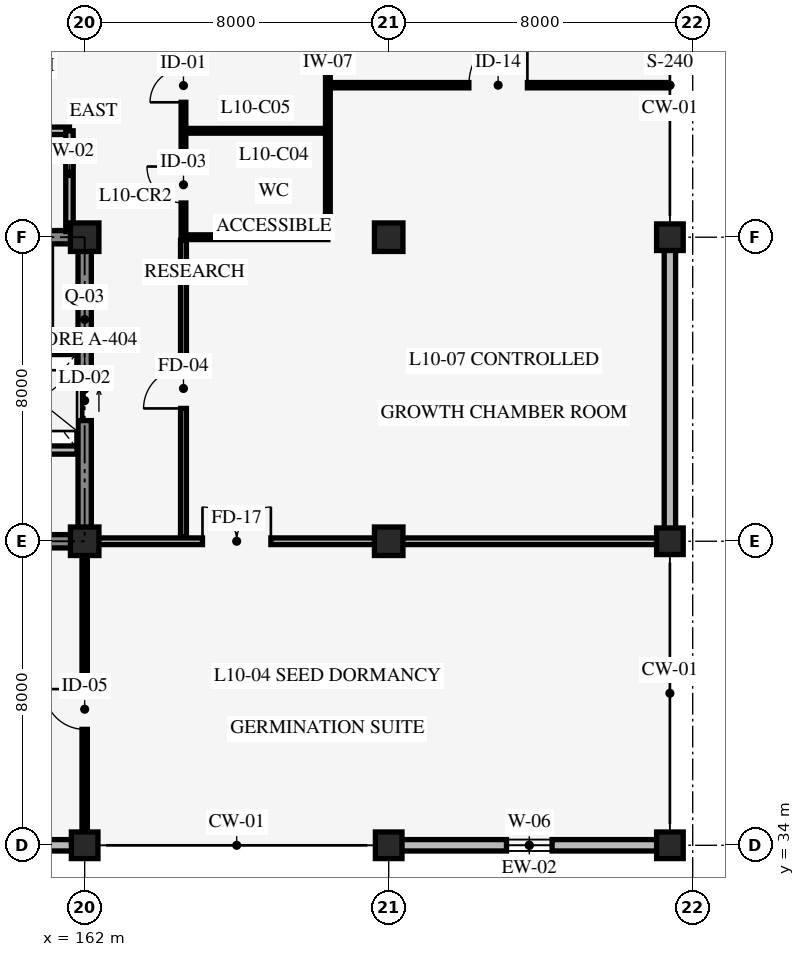
"""IFC4 building model, lengths in metres.
Left out: names, types, materials, properties, quantities, classifications, styles, units other than length and angle.
Written with IfcOpenShell. Run it as: python <this file> out.ifc"""

import sys

from ifc_helpers import new_model, si_unit, direction, frame, frame_2d, origin, origin_2d, place, context, subcontext, project, spatial, rectangle, extrude, element, fill, save


model = new_model("IFC4")
c1 = context("Model", 3, precision=1e-05, world=origin(), true_north=direction((0.0, 1.0)))
c2 = subcontext(c1, "Body", "Model", "MODEL_VIEW")
j1 = project(units=[si_unit("LENGTHUNIT", "METRE"), si_unit("PLANEANGLEUNIT", "RADIAN")], contexts=[c1])
p1 = place(None, origin())
s1 = spatial("IfcSite", under=j1, at=p1, CompositionType="ELEMENT")
p2 = place(p1, origin())
s2 = spatial("IfcBuilding", under=s1, at=p2, CompositionType="ELEMENT")
p3 = place(p2, frame((0.0, 0.0, 40.2)))
s3 = spatial("IfcBuildingStorey", under=s2, at=p3, CompositionType="ELEMENT", Elevation=40.2)
p4 = place(p3, frame((154.0, 42.0, 0.0), z_axis=(0.0, 0.0, 1.0), x_axis=(1.0, 0.0, 0.0)))
e1 = element("IfcWall", 1, at=p4, inside=s3, PredefinedType="SHEAR", context=c2, shape_type="SweptSolid", body=[
    extrude(rectangle(XDim=8.0, YDim=0.35, at=frame_2d((4.0, 0.0))), origin(), (0.0, 0.0, 1.0), 3.95),
])
p5 = place(p3, frame((162.0, 42.0, 0.0), z_axis=(0.0, 0.0, 1.0), x_axis=(0.0, 1.0, 0.0)))
e2 = element("IfcWall", 2, at=p5, inside=s3, PredefinedType="SHEAR", context=c2, shape_type="SweptSolid", body=[
    extrude(rectangle(XDim=8.0, YDim=0.35, at=frame_2d((4.0, 0.0))), origin(), (0.0, 0.0, 1.0), 3.95),
])
p6 = place(p5, frame((3.175, 0.0, 0.0)))
e3 = element("IfcOpeningElement", 3, at=p6, cuts=e2, PredefinedType="OPENING", context=c2, shape_type="SweptSolid", body=[
    extrude(rectangle(XDim=1.05, YDim=2.2, at=frame_2d((0.525, 1.1))), frame((0.0, 0.185, 0.0), z_axis=(0.0, -1.0, 0.0), x_axis=(1.0, 0.0, 0.0)), (0.0, 0.0, 1.0), 0.37),
])
p7 = place(p3, frame((162.0, 50.0, 0.0), z_axis=(0.0, 0.0, 1.0), x_axis=(-1.0, 0.0, 0.0)))
e4 = element("IfcWall", 4, at=p7, inside=s3, PredefinedType="SHEAR", context=c2, shape_type="SweptSolid", body=[
    extrude(rectangle(XDim=8.0, YDim=0.35, at=frame_2d((4.0, 0.0))), origin(), (0.0, 0.0, 1.0), 3.95),
])
p8 = place(p7, frame((5.3, 0.0, 0.0)))
e5 = element("IfcOpeningElement", 5, at=p8, cuts=e4, PredefinedType="OPENING", context=c2, shape_type="SweptSolid", body=[
    extrude(rectangle(XDim=1.3, YDim=2.15, at=frame_2d((0.65, 1.075))), frame((0.0, 0.185, 0.0), z_axis=(0.0, -1.0, 0.0), x_axis=(1.0, 0.0, 0.0)), (0.0, 0.0, 1.0), 0.37),
])
p9 = place(p7, frame((1.45, 0.0, 0.0)))
e6 = element("IfcOpeningElement", 6, at=p9, cuts=e4, PredefinedType="OPENING", context=c2, shape_type="SweptSolid", body=[
    extrude(rectangle(XDim=1.1, YDim=2.2, at=frame_2d((0.55, 1.1))), frame((0.0, 0.185, 0.0), z_axis=(0.0, -1.0, 0.0), x_axis=(1.0, 0.0, 0.0)), (0.0, 0.0, 1.0), 0.37),
])
p10 = place(p3, frame((162.0, 34.0, 0.0), z_axis=(0.0, 0.0, 1.0), x_axis=(1.0, 0.0, 0.0)))
e7 = element("IfcColumn", 7, at=p10, inside=s3, PredefinedType="COLUMN", context=c2, shape_type="SweptSolid", body=[
    extrude(rectangle(XDim=0.7, YDim=0.7, at=origin_2d()), origin(), (0.0, 0.0, 1.0), 4.2),
])
for number, where, z_axis, x_axis in (
    (8, (162.0, 42.0, 0.0), (0.0, 0.0, 1.0), (1.0, 0.0, 0.0)),
    (9, (162.0, 50.0, 0.0), (0.0, 0.0, 1.0), (1.0, 0.0, 0.0)),
):
    element("IfcColumn", number, at=place(p3, frame(where, z_axis=z_axis, x_axis=x_axis)), inside=s3, PredefinedType="COLUMN", context=c2, shape_type="SweptSolid", body=[
        extrude(rectangle(XDim=0.75, YDim=0.75, at=origin_2d()), origin(), (0.0, 0.0, 1.0), 4.2),
    ])
p11 = place(p3, frame((170.0, 34.0, 0.0), z_axis=(0.0, 0.0, 1.0), x_axis=(1.0, 0.0, 0.0)))
e10 = element("IfcColumn", 10, at=p11, inside=s3, PredefinedType="COLUMN", context=c2, shape_type="SweptSolid", body=[
    extrude(rectangle(XDim=0.7, YDim=0.7, at=origin_2d()), origin(), (0.0, 0.0, 1.0), 4.2),
])
for number, where, z_axis, x_axis in (
    (11, (170.0, 42.0, 0.0), (0.0, 0.0, 1.0), (1.0, 0.0, 0.0)),
    (12, (170.0, 50.0, 0.0), (0.0, 0.0, 1.0), (1.0, 0.0, 0.0)),
):
    element("IfcColumn", number, at=place(p3, frame(where, z_axis=z_axis, x_axis=x_axis)), inside=s3, PredefinedType="COLUMN", context=c2, shape_type="SweptSolid", body=[
        extrude(rectangle(XDim=0.75, YDim=0.75, at=origin_2d()), origin(), (0.0, 0.0, 1.0), 4.2),
    ])
for number, where, z_axis, x_axis in (
    (13, (177.4, 34.0, 0.0), (0.0, 0.0, 1.0), (1.0, 0.0, 0.0)),
    (14, (177.4, 42.0, 0.0), (0.0, 0.0, 1.0), (1.0, 0.0, 0.0)),
    (15, (177.4, 50.0, 0.0), (0.0, 0.0, 1.0), (1.0, 0.0, 0.0)),
):
    element("IfcColumn", number, at=place(p3, frame(where, z_axis=z_axis, x_axis=x_axis)), inside=s3, PredefinedType="COLUMN", context=c2, shape_type="SweptSolid", body=[
        extrude(rectangle(XDim=0.7, YDim=0.7, at=origin_2d()), origin(), (0.0, 0.0, 1.0), 4.2),
    ])
p12 = place(p3, frame((177.4, 34.0, 0.0), z_axis=(0.0, 0.0, 1.0), x_axis=(-1.0, 0.0, 0.0)))
e16 = element("IfcWall", 16, at=p12, inside=s3, PredefinedType="STANDARD", context=c2, shape_type="SweptSolid", body=[
    extrude(rectangle(XDim=7.4, YDim=0.3, at=frame_2d((3.7, 0.0))), origin(), (0.0, 0.0, 1.0), 3.09),
])
p13 = place(p12, frame((3.1, 0.0, 0.85)))
e17 = element("IfcOpeningElement", 17, at=p13, cuts=e16, PredefinedType="OPENING", context=c2, shape_type="SweptSolid", body=[
    extrude(rectangle(XDim=1.2, YDim=1.2, at=frame_2d((0.6, 0.6))), frame((0.0, 0.16, 0.0), z_axis=(0.0, -1.0, 0.0), x_axis=(1.0, 0.0, 0.0)), (0.0, 0.0, 1.0), 0.32),
])
p14 = place(p3, frame((162.0, 34.0, 0.0), z_axis=(0.0, 0.0, 1.0), x_axis=(-1.0, 0.0, 0.0)))
e18 = element("IfcWall", 18, at=p14, inside=s3, PredefinedType="STANDARD", context=c2, shape_type="SweptSolid", body=[
    extrude(rectangle(XDim=8.0, YDim=0.3, at=frame_2d((4.0, 0.0))), origin(), (0.0, 0.0, 1.0), 3.09),
])
p15 = place(p14, frame((3.0, 0.0, 0.85)))
e19 = element("IfcOpeningElement", 19, at=p15, cuts=e18, PredefinedType="OPENING", context=c2, shape_type="SweptSolid", body=[
    extrude(rectangle(XDim=2.0, YDim=1.5, at=frame_2d((1.0, 0.75))), frame((0.0, 0.16, 0.0), z_axis=(0.0, -1.0, 0.0), x_axis=(1.0, 0.0, 0.0)), (0.0, 0.0, 1.0), 0.32),
])
p16 = place(p3, frame((177.4, 50.0, 0.0), z_axis=(0.0, 0.0, 1.0), x_axis=(0.0, -1.0, 0.0)))
e20 = element("IfcWall", 20, at=p16, inside=s3, PredefinedType="STANDARD", context=c2, shape_type="SweptSolid", body=[
    extrude(rectangle(XDim=8.0, YDim=0.3, at=frame_2d((4.0, 0.0))), origin(), (0.0, 0.0, 1.0), 3.14),
])
p17 = place(p3, frame((158.45, 47.02, 0.0), z_axis=(0.0, 0.0, 1.0), x_axis=(1.0, 0.0, 0.0)))
e21 = element("IfcWall", 21, at=p17, inside=s3, PredefinedType="STANDARD", context=c2, shape_type="SweptSolid", body=[
    extrude(rectangle(XDim=3.35, YDim=0.215, at=frame_2d((1.675, 0.0))), origin(), (0.0, 0.0, 1.0), 3.9),
])
p18 = place(p3, frame((159.78, 44.4, 0.0), z_axis=(0.0, 0.0, 1.0), x_axis=(1.0, 0.0, 0.0)))
e22 = element("IfcWall", 22, at=p18, inside=s3, PredefinedType="STANDARD", context=c2, shape_type="SweptSolid", body=[
    extrude(rectangle(XDim=2.02, YDim=0.215, at=frame_2d((1.01, 0.0))), origin(), (0.0, 0.0, 1.0), 3.9),
])
p19 = place(p3, frame((154.0, 52.8, 0.0), z_axis=(0.0, 0.0, 1.0), x_axis=(1.0, 0.0, 0.0)))
e23 = element("IfcWall", 23, at=p19, inside=s3, PredefinedType="STANDARD", context=c2, shape_type="SweptSolid", body=[
    extrude(rectangle(XDim=7.6, YDim=0.195, at=frame_2d((3.8, 0.0))), origin(), (0.0, 0.0, 1.0), 3.9),
])
p20 = place(p19, frame((2.8, 0.0, 0.0)))
e24 = element("IfcOpeningElement", 24, at=p20, cuts=e23, PredefinedType="OPENING", context=c2, shape_type="SweptSolid", body=[
    extrude(rectangle(XDim=1.4, YDim=2.2, at=frame_2d((0.7, 1.1))), frame((0.0, 0.107, 0.0), z_axis=(0.0, -1.0, 0.0), x_axis=(1.0, 0.0, 0.0)), (0.0, 0.0, 1.0), 0.215),
])
p21 = place(p3, frame((161.6, 50.15, 0.0), z_axis=(0.0, 0.0, 1.0), x_axis=(0.0, 1.0, 0.0)))
e25 = element("IfcWall", 25, at=p21, inside=s3, PredefinedType="STANDARD", context=c2, shape_type="SweptSolid", body=[
    extrude(rectangle(XDim=2.65, YDim=0.195, at=frame_2d((1.325, 0.0))), origin(), (0.0, 0.0, 1.0), 3.14),
])
p22 = place(p3, frame((164.6, 50.0, 0.0), z_axis=(0.0, 0.0, 1.0), x_axis=(0.0, 1.0, 0.0)))
e26 = element("IfcWall", 26, at=p22, inside=s3, PredefinedType="STANDARD", context=c2, shape_type="SweptSolid", body=[
    extrude(rectangle(XDim=8.0, YDim=0.125, at=frame_2d((4.0, 0.0))), origin(), (0.0, 0.0, 1.0), 3.9),
])
p23 = place(p22, frame((0.9, 0.0, 0.0)))
e27 = element("IfcOpeningElement", 27, at=p23, cuts=e26, PredefinedType="OPENING", context=c2, shape_type="SweptSolid", body=[
    extrude(rectangle(XDim=0.96, YDim=2.08, at=frame_2d((0.48, 1.04))), frame((0.0, 0.073, 0.0), z_axis=(0.0, -1.0, 0.0), x_axis=(1.0, 0.0, 0.0)), (0.0, 0.0, 1.0), 0.145),
])
p24 = place(p22, frame((3.55, 0.0, 0.0)))
e28 = element("IfcOpeningElement", 28, at=p24, cuts=e26, PredefinedType="OPENING", context=c2, shape_type="SweptSolid", body=[
    extrude(rectangle(XDim=0.88, YDim=2.05, at=frame_2d((0.44, 1.025))), frame((0.0, 0.073, 0.0), z_axis=(0.0, -1.0, 0.0), x_axis=(1.0, 0.0, 0.0)), (0.0, 0.0, 1.0), 0.145),
])
p25 = place(p22, frame((6.15, 0.0, 0.0)))
e29 = element("IfcOpeningElement", 29, at=p25, cuts=e26, PredefinedType="OPENING", context=c2, shape_type="SweptSolid", body=[
    extrude(rectangle(XDim=0.92, YDim=2.05, at=frame_2d((0.46, 1.025))), frame((0.0, 0.073, 0.0), z_axis=(0.0, -1.0, 0.0), x_axis=(1.0, 0.0, 0.0)), (0.0, 0.0, 1.0), 0.145),
])
p26 = place(p3, frame((168.4, 50.0, 0.0), z_axis=(0.0, 0.0, 1.0), x_axis=(0.0, 1.0, 0.0)))
e30 = element("IfcWall", 30, at=p26, inside=s3, PredefinedType="STANDARD", context=c2, shape_type="SweptSolid", body=[
    extrude(rectangle(XDim=8.0, YDim=0.125, at=frame_2d((4.0, 0.0))), origin(), (0.0, 0.0, 1.0), 3.9),
])
p27 = place(p3, frame((164.6, 50.0, 0.0), z_axis=(0.0, 0.0, 1.0), x_axis=(1.0, 0.0, 0.0)))
e31 = element("IfcWall", 31, at=p27, inside=s3, PredefinedType="STANDARD", context=c2, shape_type="SweptSolid", body=[
    extrude(rectangle(XDim=3.8, YDim=0.125, at=frame_2d((1.9, 0.0))), origin(), (0.0, 0.0, 1.0), 3.09),
])
p28 = place(p3, frame((164.6, 52.8, 0.0), z_axis=(0.0, 0.0, 1.0), x_axis=(1.0, 0.0, 0.0)))
e32 = element("IfcWall", 32, at=p28, inside=s3, PredefinedType="STANDARD", context=c2, shape_type="SweptSolid", body=[
    extrude(rectangle(XDim=3.8, YDim=0.125, at=frame_2d((1.9, 0.0))), origin(), (0.0, 0.0, 1.0), 3.9),
])
p29 = place(p3, frame((164.6, 42.12, 0.0), z_axis=(0.0, 0.0, 1.0), x_axis=(0.0, 1.0, 0.0)))
e33 = element("IfcWall", 33, at=p29, inside=s3, PredefinedType="STANDARD", context=c2, shape_type="SweptSolid", body=[
    extrude(rectangle(XDim=7.8, YDim=0.155, at=frame_2d((3.9, 0.0))), origin(), (0.0, 0.0, 1.0), 3.9),
])
p30 = place(p29, frame((3.375, 0.0, 0.0)))
e34 = element("IfcOpeningElement", 34, at=p30, cuts=e33, PredefinedType="OPENING", context=c2, shape_type="SweptSolid", body=[
    extrude(rectangle(XDim=1.05, YDim=2.1, at=frame_2d((0.525, 1.05))), frame((0.0, 0.087, 0.0), z_axis=(0.0, -1.0, 0.0), x_axis=(1.0, 0.0, 0.0)), (0.0, 0.0, 1.0), 0.175),
])
p31 = place(p3, frame((168.4, 54.0, 0.0), z_axis=(0.0, 0.0, 1.0), x_axis=(1.0, 0.0, 0.0)))
e35 = element("IfcWall", 35, at=p31, inside=s3, PredefinedType="STANDARD", context=c2, shape_type="SweptSolid", body=[
    extrude(rectangle(XDim=8.96, YDim=0.14, at=frame_2d((4.48, 0.0))), origin(), (0.0, 0.0, 1.0), 3.9),
])
p32 = place(p31, frame((3.71, 0.0, 0.0)))
e36 = element("IfcOpeningElement", 36, at=p32, cuts=e35, PredefinedType="OPENING", context=c2, shape_type="SweptSolid", body=[
    extrude(rectangle(XDim=1.54, YDim=2.22, at=frame_2d((0.77, 1.11))), frame((0.0, 0.08, 0.0), z_axis=(0.0, -1.0, 0.0), x_axis=(1.0, 0.0, 0.0)), (0.0, 0.0, 1.0), 0.16),
])
p33 = place(p3, frame((162.0, 34.05, 0.0), z_axis=(0.0, 0.0, 1.0), x_axis=(0.0, 1.0, 0.0)))
e37 = element("IfcWall", 37, at=p33, inside=s3, PredefinedType="STANDARD", context=c2, shape_type="SweptSolid", body=[
    extrude(rectangle(XDim=7.83, YDim=0.14, at=frame_2d((3.915, 0.0))), origin(), (0.0, 0.0, 1.0), 3.14),
])
p34 = place(p33, frame((3.0, 0.0, 0.0)))
e38 = element("IfcOpeningElement", 38, at=p34, cuts=e37, PredefinedType="OPENING", context=c2, shape_type="SweptSolid", body=[
    extrude(rectangle(XDim=1.06, YDim=2.12, at=frame_2d((0.53, 1.06))), frame((0.0, 0.08, 0.0), z_axis=(0.0, -1.0, 0.0), x_axis=(1.0, 0.0, 0.0)), (0.0, 0.0, 1.0), 0.16),
])
p35 = place(p3, frame((162.35, 42.0, 0.0), z_axis=(0.0, 0.0, 1.0), x_axis=(1.0, 0.0, 0.0)))
e39 = element("IfcWall", 39, at=p35, inside=s3, PredefinedType="STANDARD", context=c2, shape_type="SweptSolid", body=[
    extrude(rectangle(XDim=14.7, YDim=0.175, at=frame_2d((7.35, 0.0))), origin(), (0.0, 0.0, 1.0), 3.09),
])
p36 = place(p35, frame((2.75, 0.0, 0.0)))
e40 = element("IfcOpeningElement", 40, at=p36, cuts=e39, PredefinedType="OPENING", context=c2, shape_type="SweptSolid", body=[
    extrude(rectangle(XDim=1.8, YDim=2.3, at=frame_2d((0.9, 1.15))), frame((0.0, 0.098, 0.0), z_axis=(0.0, -1.0, 0.0), x_axis=(1.0, 0.0, 0.0)), (0.0, 0.0, 1.0), 0.195),
])
p37 = place(p13, origin())
e41 = element("IfcWindow", 41, at=p37, inside=s3, PartitioningType="SINGLE_PANEL", PredefinedType="WINDOW", context=c2, shape_type="SweptSolid", body=[
    extrude(rectangle(XDim=1.2, YDim=1.2, at=frame_2d((0.6, 0.6))), frame((0.0, 0.03, 0.0), z_axis=(0.0, -1.0, 0.0), x_axis=(1.0, 0.0, 0.0)), (0.0, 0.0, 1.0), 0.06),
])
fill(e17, e41)
p38 = place(p6, origin())
e42 = element("IfcDoor", 42, at=p38, inside=s3, OperationType="SLIDING_TO_LEFT", PredefinedType="DOOR", context=c2, shape_type="SweptSolid", body=[
    extrude(rectangle(XDim=1.05, YDim=2.2, at=frame_2d((0.525, 1.1))), frame((0.0, 0.025, 0.0), z_axis=(0.0, -1.0, 0.0), x_axis=(1.0, 0.0, 0.0)), (0.0, 0.0, 1.0), 0.05),
])
fill(e3, e42)
p39 = place(p23, origin())
e43 = element("IfcDoor", 43, at=p39, inside=s3, OperationType="SINGLE_SWING_RIGHT", PredefinedType="DOOR", context=c2, shape_type="SweptSolid", body=[
    extrude(rectangle(XDim=0.96, YDim=2.08, at=frame_2d((0.48, 1.04))), frame((0.0, 0.025, 0.0), z_axis=(0.0, -1.0, 0.0), x_axis=(1.0, 0.0, 0.0)), (0.0, 0.0, 1.0), 0.05),
])
fill(e27, e43)
p40 = place(p24, origin())
e44 = element("IfcDoor", 44, at=p40, inside=s3, OperationType="SINGLE_SWING_LEFT", PredefinedType="DOOR", context=c2, shape_type="SweptSolid", body=[
    extrude(rectangle(XDim=0.88, YDim=2.05, at=frame_2d((0.44, 1.025))), frame((0.0, 0.025, 0.0), z_axis=(0.0, -1.0, 0.0), x_axis=(1.0, 0.0, 0.0)), (0.0, 0.0, 1.0), 0.05),
])
fill(e28, e44)
p41 = place(p30, origin())
e45 = element("IfcDoor", 45, at=p41, inside=s3, OperationType="SINGLE_SWING_LEFT", PredefinedType="DOOR", context=c2, shape_type="SweptSolid", body=[
    extrude(rectangle(XDim=1.05, YDim=2.1, at=frame_2d((0.525, 1.05))), frame((0.0, 0.025, 0.0), z_axis=(0.0, -1.0, 0.0), x_axis=(1.0, 0.0, 0.0)), (0.0, 0.0, 1.0), 0.05),
])
fill(e34, e45)
p42 = place(p32, origin())
e46 = element("IfcDoor", 46, at=p42, inside=s3, OperationType="SINGLE_SWING_RIGHT", PredefinedType="DOOR", context=c2, shape_type="SweptSolid", body=[
    extrude(rectangle(XDim=1.54, YDim=2.22, at=frame_2d((0.77, 1.11))), frame((0.0, 0.025, 0.0), z_axis=(0.0, -1.0, 0.0), x_axis=(1.0, 0.0, 0.0)), (0.0, 0.0, 1.0), 0.05),
])
fill(e36, e46)
p43 = place(p34, origin())
e47 = element("IfcDoor", 47, at=p43, inside=s3, OperationType="SINGLE_SWING_RIGHT", PredefinedType="DOOR", context=c2, shape_type="SweptSolid", body=[
    extrude(rectangle(XDim=1.06, YDim=2.12, at=frame_2d((0.53, 1.06))), frame((0.0, 0.025, 0.0), z_axis=(0.0, -1.0, 0.0), x_axis=(1.0, 0.0, 0.0)), (0.0, 0.0, 1.0), 0.05),
])
fill(e38, e47)
p44 = place(p36, origin())
e48 = element("IfcDoor", 48, at=p44, inside=s3, OperationType="DOUBLE_DOOR_SINGLE_SWING", PredefinedType="DOOR", context=c2, shape_type="SweptSolid", body=[
    extrude(rectangle(XDim=1.8, YDim=2.3, at=frame_2d((0.9, 1.15))), frame((0.0, 0.025, 0.0), z_axis=(0.0, -1.0, 0.0), x_axis=(1.0, 0.0, 0.0)), (0.0, 0.0, 1.0), 0.05),
])
fill(e40, e48)
save(model, sys.argv[1])
